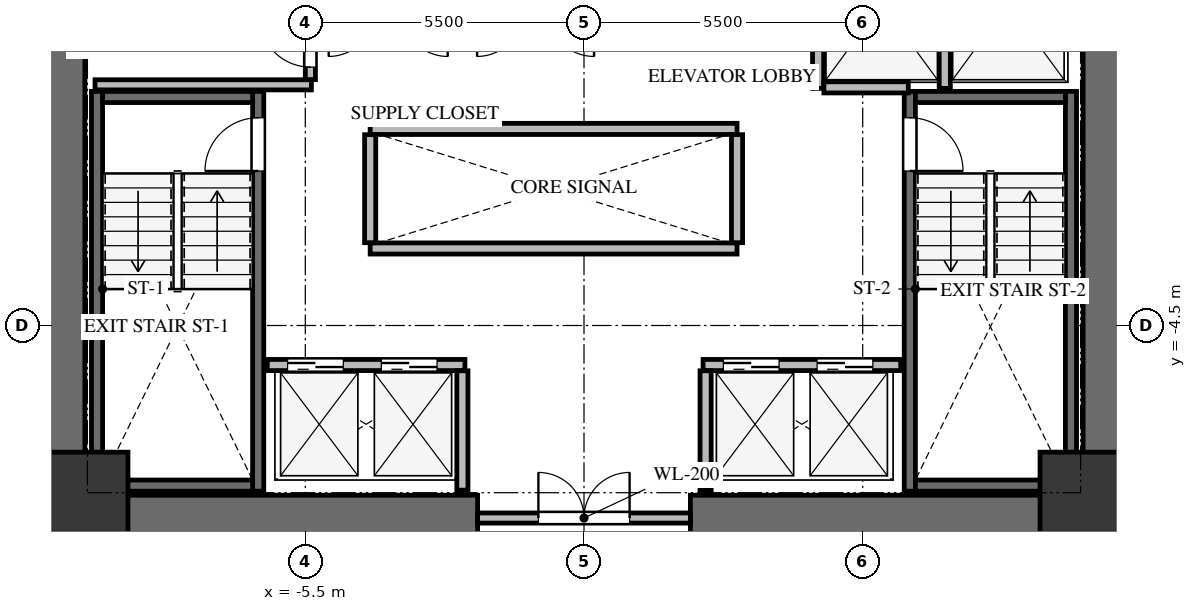
"""IFC4 building model, lengths in metres.
Left out: names, types, materials, properties, quantities, classifications, styles, units other than length and angle.
Written with IfcOpenShell. Run it as: python <this file> out.ifc"""

import sys

from ifc_helpers import new_model, si_unit, direction, frame, frame_2d, origin, origin_2d, place, context, subcontext, project, spatial, rectangle, extrude, source, transform, mapped, element, fill, save


model = new_model("IFC4")
c1 = context("Model", 3, precision=1e-05, world=origin(), true_north=direction((0.0, 1.0)))
c2 = subcontext(c1, "Body", "Model", "MODEL_VIEW")
j1 = project(units=[si_unit("LENGTHUNIT", "METRE"), si_unit("PLANEANGLEUNIT", "RADIAN")], contexts=[c1])
p1 = place(None, origin())
s1 = spatial("IfcSite", under=j1, at=p1, CompositionType="ELEMENT")
p2 = place(p1, origin())
s2 = spatial("IfcBuilding", under=s1, at=p2, CompositionType="ELEMENT")
p3 = place(p2, frame((0.0, 0.0, 81.3)))
s3 = spatial("IfcBuildingStorey", under=s2, at=p3, CompositionType="ELEMENT", Elevation=81.3)
for number, where, z_axis, x_axis in (
    (1, (-10.3, -8.75, 0.0), (0.0, 0.0, 1.0), (0.0, 1.0, 0.0)),
    (2, (10.3, -8.75, 0.0), (0.0, 0.0, 1.0), (0.0, 1.0, 0.0)),
):
    element("IfcWall", number, at=place(p3, frame(where, z_axis=z_axis, x_axis=x_axis)), inside=s3, PredefinedType="SHEAR", context=c2, shape_type="SweptSolid", body=[
        extrude(rectangle(XDim=17.5, YDim=0.9, at=frame_2d((8.75, 0.0))), origin(), (0.0, 0.0, 1.0), 3.0),
    ])
for number, where, z_axis, x_axis in (
    (3, (-9.85, -8.3, 0.0), (0.0, 0.0, 1.0), (1.0, 0.0, 0.0)),
    (4, (2.1, -8.3, 0.0), (0.0, 0.0, 1.0), (1.0, 0.0, 0.0)),
):
    element("IfcWall", number, at=place(p3, frame(where, z_axis=z_axis, x_axis=x_axis)), inside=s3, PredefinedType="SHEAR", context=c2, shape_type="SweptSolid", body=[
        extrude(rectangle(XDim=7.75, YDim=0.9, at=frame_2d((3.875, 0.0))), origin(), (0.0, 0.0, 1.0), 3.0),
    ])
p4 = place(p3, frame((-6.43, -7.77, -0.24), z_axis=(0.0, 0.0, 1.0), x_axis=(0.0, 1.0, 0.0)))
e5 = element("IfcWall", 5, at=p4, inside=s3, PredefinedType="SHEAR", context=c2, shape_type="SweptSolid", body=[
    extrude(rectangle(XDim=7.89, YDim=0.22, at=frame_2d((3.945, 0.0))), origin(), (0.0, 0.0, 1.0), 3.0),
])
p5 = place(p4, frame((6.32, 0.0, 0.0)))
e6 = element("IfcOpeningElement", 6, at=p5, cuts=e5, PredefinedType="OPENING", context=c2, shape_type="SweptSolid", body=[
    extrude(rectangle(XDim=1.05, YDim=2.15, at=frame_2d((0.525, 1.075))), frame((0.0, 0.12, 0.0), z_axis=(0.0, -1.0, 0.0), x_axis=(1.0, 0.0, 0.0)), (0.0, 0.0, 1.0), 0.24),
])
p6 = place(p3, frame((-9.61, 0.12, -0.24), z_axis=(0.0, 0.0, 1.0), x_axis=(0.0, -1.0, 0.0)))
e7 = element("IfcWall", 7, at=p6, inside=s3, PredefinedType="SHEAR", context=c2, shape_type="SweptSolid", body=[
    extrude(rectangle(XDim=7.89, YDim=0.22, at=frame_2d((3.945, 0.0))), origin(), (0.0, 0.0, 1.0), 3.0),
])
for number, where, z_axis, x_axis in (
    (8, (-9.5, -7.66, -0.24), (0.0, 0.0, 1.0), (1.0, 0.0, 0.0)),
    (9, (-6.54, 0.01, -0.24), (0.0, 0.0, 1.0), (-1.0, 0.0, 0.0)),
):
    element("IfcWall", number, at=place(p3, frame(where, z_axis=z_axis, x_axis=x_axis)), inside=s3, PredefinedType="SHEAR", context=c2, shape_type="SweptSolid", body=[
        extrude(rectangle(XDim=2.96, YDim=0.22, at=frame_2d((1.48, 0.0))), origin(), (0.0, 0.0, 1.0), 3.0),
    ])
p7 = place(p3, frame((9.61, -7.77, -0.24), z_axis=(0.0, 0.0, 1.0), x_axis=(0.0, 1.0, 0.0)))
e10 = element("IfcWall", 10, at=p7, inside=s3, PredefinedType="SHEAR", context=c2, shape_type="SweptSolid", body=[
    extrude(rectangle(XDim=7.89, YDim=0.22, at=frame_2d((3.945, 0.0))), origin(), (0.0, 0.0, 1.0), 3.0),
])
p8 = place(p3, frame((6.43, 0.12, -0.24), z_axis=(0.0, 0.0, 1.0), x_axis=(0.0, -1.0, 0.0)))
e11 = element("IfcWall", 11, at=p8, inside=s3, PredefinedType="SHEAR", context=c2, shape_type="SweptSolid", body=[
    extrude(rectangle(XDim=7.89, YDim=0.22, at=frame_2d((3.945, 0.0))), origin(), (0.0, 0.0, 1.0), 3.0),
])
p9 = place(p8, frame((0.52, 0.0, 0.0)))
e12 = element("IfcOpeningElement", 12, at=p9, cuts=e11, PredefinedType="OPENING", context=c2, shape_type="SweptSolid", body=[
    extrude(rectangle(XDim=1.05, YDim=2.15, at=frame_2d((0.525, 1.075))), frame((0.0, 0.12, 0.0), z_axis=(0.0, -1.0, 0.0), x_axis=(1.0, 0.0, 0.0)), (0.0, 0.0, 1.0), 0.24),
])
for number, where, z_axis, x_axis in (
    (13, (6.54, -7.66, -0.24), (0.0, 0.0, 1.0), (1.0, 0.0, 0.0)),
    (14, (9.5, 0.01, -0.24), (0.0, 0.0, 1.0), (-1.0, 0.0, 0.0)),
):
    element("IfcWall", number, at=place(p3, frame(where, z_axis=z_axis, x_axis=x_axis)), inside=s3, PredefinedType="SHEAR", context=c2, shape_type="SweptSolid", body=[
        extrude(rectangle(XDim=2.96, YDim=0.22, at=frame_2d((1.48, 0.0))), origin(), (0.0, 0.0, 1.0), 3.0),
    ])
m1 = source(origin(), c2, "Body", "SweptSolid", [
    extrude(rectangle(XDim=1.6, YDim=1.6, at=origin_2d()), origin(), (0.0, 0.0, 1.0), 3.0),
])
for number, where, z_axis, x_axis in (
    (15, (-9.8, -7.8, -0.24), (0.0, 0.0, 1.0), (1.0, 0.0, 0.0)),
    (16, (9.8, -7.8, -0.24), (0.0, 0.0, 1.0), (1.0, 0.0, 0.0)),
):
    element("IfcColumn", number, at=place(p3, frame(where, z_axis=z_axis, x_axis=x_axis)), inside=s3, PredefinedType="COLUMN", context=c2, shape_type="MappedRepresentation", body=[
        mapped(m1, transform((0.0, 0.0, 0.0), x_axis=(1.0, 0.0, 0.0), y_axis=(0.0, 1.0, 0.0), z_axis=(0.0, 0.0, 1.0), scale=1.0)),
    ])
p10 = place(p3, frame((-2.1, -8.3, 0.0), z_axis=(0.0, 0.0, 1.0), x_axis=(1.0, 0.0, 0.0)))
e17 = element("IfcWall", 17, at=p10, inside=s3, PredefinedType="SOLIDWALL", context=c2, shape_type="SweptSolid", body=[
    extrude(rectangle(XDim=4.2, YDim=0.2, at=frame_2d((2.1, 0.0))), origin(), (0.0, 0.0, 1.0), 2.745),
])
p11 = place(p10, frame((1.2, 0.0, 0.0)))
e18 = element("IfcOpeningElement", 18, at=p11, cuts=e17, PredefinedType="OPENING", context=c2, shape_type="SweptSolid", body=[
    extrude(rectangle(XDim=1.8, YDim=2.15, at=frame_2d((0.9, 1.075))), frame((0.0, 0.11, 0.0), z_axis=(0.0, -1.0, 0.0), x_axis=(1.0, 0.0, 0.0)), (0.0, 0.0, 1.0), 0.22),
])
p12 = place(p3, frame((-9.65, 0.25, 0.0), z_axis=(0.0, 0.0, 1.0), x_axis=(1.0, 0.0, 0.0)))
e19 = element("IfcWall", 19, at=p12, inside=s3, PredefinedType="SOLIDWALL", context=c2, shape_type="SweptSolid", body=[
    extrude(rectangle(XDim=4.27, YDim=0.2, at=frame_2d((2.135, 0.0))), origin(), (0.0, 0.0, 1.0), 2.745),
])
p13 = place(p3, frame((-5.4, 0.354, 0.0), z_axis=(0.0, 0.0, 1.0), x_axis=(0.0, 1.0, 0.0)))
e20 = element("IfcWall", 20, at=p13, inside=s3, PredefinedType="SOLIDWALL", context=c2, shape_type="SweptSolid", body=[
    extrude(rectangle(XDim=4.026, YDim=0.2, at=frame_2d((2.013, 0.0))), origin(), (0.0, 0.0, 1.0), 2.745),
])
p14 = place(p13, frame((0.246, 0.0, 0.0)))
e21 = element("IfcOpeningElement", 21, at=p14, cuts=e20, PredefinedType="OPENING", context=c2, shape_type="SweptSolid", body=[
    extrude(rectangle(XDim=1.0, YDim=2.15, at=frame_2d((0.5, 1.075))), frame((0.0, 0.11, 0.0), z_axis=(0.0, -1.0, 0.0), x_axis=(1.0, 0.0, 0.0)), (0.0, 0.0, 1.0), 0.22),
])
for number, where, z_axis, x_axis in (
    (22, (4.62, 0.18, 0.0), (0.0, 0.0, 1.0), (0.0, 1.0, 0.0)),
    (23, (7.12, 0.18, 0.0), (0.0, 0.0, 1.0), (0.0, 1.0, 0.0)),
):
    element("IfcWall", number, at=place(p3, frame(where, z_axis=z_axis, x_axis=x_axis)), inside=s3, PredefinedType="SOLIDWALL", context=c2, shape_type="SweptSolid", body=[
        extrude(rectangle(XDim=3.186, YDim=0.22, at=frame_2d((1.593, 0.0))), origin(), (0.0, 0.0, 1.0), 2.745),
    ])
p15 = place(p3, frame((4.734, 0.2, 0.0), z_axis=(0.0, 0.0, 1.0), x_axis=(1.0, 0.0, 0.0)))
e24 = element("IfcWall", 24, at=p15, inside=s3, PredefinedType="SOLIDWALL", context=c2, shape_type="SweptSolid", body=[
    extrude(rectangle(XDim=1.666, YDim=0.22, at=frame_2d((0.833, 0.0))), origin(), (0.0, 0.0, 1.0), 2.745),
])
p16 = place(p3, frame((-6.25, -5.28, 0.0), z_axis=(0.0, 0.0, 1.0), x_axis=(1.0, 0.0, 0.0)))
e25 = element("IfcWall", 25, at=p16, inside=s3, PredefinedType="SOLIDWALL", context=c2, shape_type="SweptSolid", body=[
    extrude(rectangle(XDim=3.9, YDim=0.22, at=frame_2d((1.95, 0.0))), origin(), (0.0, 0.0, 1.0), 2.745),
])
p17 = place(p16, frame((0.4, 0.0, 0.0)))
e26 = element("IfcOpeningElement", 26, at=p17, cuts=e25, PredefinedType="OPENING", context=c2, shape_type="SweptSolid", body=[
    extrude(rectangle(XDim=1.1, YDim=2.15, at=frame_2d((0.55, 1.075))), frame((0.0, 0.12, 0.0), z_axis=(0.0, -1.0, 0.0), x_axis=(1.0, 0.0, 0.0)), (0.0, 0.0, 1.0), 0.24),
])
p18 = place(p16, frame((2.25, 0.0, 0.0)))
e27 = element("IfcOpeningElement", 27, at=p18, cuts=e25, PredefinedType="OPENING", context=c2, shape_type="SweptSolid", body=[
    extrude(rectangle(XDim=1.1, YDim=2.15, at=frame_2d((0.55, 1.075))), frame((0.0, 0.12, 0.0), z_axis=(0.0, -1.0, 0.0), x_axis=(1.0, 0.0, 0.0)), (0.0, 0.0, 1.0), 0.24),
])
p19 = place(p3, frame((2.35, -5.28, 0.0), z_axis=(0.0, 0.0, 1.0), x_axis=(1.0, 0.0, 0.0)))
e28 = element("IfcWall", 28, at=p19, inside=s3, PredefinedType="SOLIDWALL", context=c2, shape_type="SweptSolid", body=[
    extrude(rectangle(XDim=3.9, YDim=0.22, at=frame_2d((1.95, 0.0))), origin(), (0.0, 0.0, 1.0), 2.745),
])
p20 = place(p19, frame((0.4, 0.0, 0.0)))
e29 = element("IfcOpeningElement", 29, at=p20, cuts=e28, PredefinedType="OPENING", context=c2, shape_type="SweptSolid", body=[
    extrude(rectangle(XDim=1.1, YDim=2.15, at=frame_2d((0.55, 1.075))), frame((0.0, 0.12, 0.0), z_axis=(0.0, -1.0, 0.0), x_axis=(1.0, 0.0, 0.0)), (0.0, 0.0, 1.0), 0.24),
])
p21 = place(p19, frame((2.25, 0.0, 0.0)))
e30 = element("IfcOpeningElement", 30, at=p21, cuts=e28, PredefinedType="OPENING", context=c2, shape_type="SweptSolid", body=[
    extrude(rectangle(XDim=1.1, YDim=2.15, at=frame_2d((0.55, 1.075))), frame((0.0, 0.12, 0.0), z_axis=(0.0, -1.0, 0.0), x_axis=(1.0, 0.0, 0.0)), (0.0, 0.0, 1.0), 0.24),
])
for number, where, z_axis, x_axis in (
    (31, (-2.4, -7.75, 0.0), (0.0, 0.0, 1.0), (0.0, 1.0, 0.0)),
    (32, (2.4, -7.75, 0.0), (0.0, 0.0, 1.0), (0.0, 1.0, 0.0)),
):
    element("IfcWall", number, at=place(p3, frame(where, z_axis=z_axis, x_axis=x_axis)), inside=s3, PredefinedType="SOLIDWALL", context=c2, shape_type="SweptSolid", body=[
        extrude(rectangle(XDim=2.356, YDim=0.22, at=frame_2d((1.178, 0.0))), origin(), (0.0, 0.0, 1.0), 2.745),
    ])
for number, where, z_axis, x_axis in (
    (33, (-4.22, -2.98, 0.0), (0.0, 0.0, 1.0), (1.0, 0.0, 0.0)),
    (34, (-4.22, -0.62, 0.0), (0.0, 0.0, 1.0), (1.0, 0.0, 0.0)),
):
    element("IfcWall", number, at=place(p3, frame(where, z_axis=z_axis, x_axis=x_axis)), inside=s3, PredefinedType="SOLIDWALL", context=c2, shape_type="SweptSolid", body=[
        extrude(rectangle(XDim=7.24, YDim=0.22, at=frame_2d((3.62, 0.0))), origin(), (0.0, 0.0, 1.0), 2.745),
    ])
for number, where, z_axis, x_axis in (
    (35, (-4.22, -2.866, 0.0), (0.0, 0.0, 1.0), (0.0, 1.0, 0.0)),
    (36, (3.02, -2.866, 0.0), (0.0, 0.0, 1.0), (0.0, 1.0, 0.0)),
):
    element("IfcWall", number, at=place(p3, frame(where, z_axis=z_axis, x_axis=x_axis)), inside=s3, PredefinedType="SOLIDWALL", context=c2, shape_type="SweptSolid", body=[
        extrude(rectangle(XDim=2.132, YDim=0.22, at=frame_2d((1.066, 0.0))), origin(), (0.0, 0.0, 1.0), 2.745),
    ])
m2 = source(origin(), c2, "Body", "SweptSolid", [
    extrude(rectangle(XDim=1.05, YDim=2.15, at=frame_2d((0.525, 1.075))), frame((0.0, 0.025, 0.0), z_axis=(0.0, -1.0, 0.0), x_axis=(1.0, 0.0, 0.0)), (0.0, 0.0, 1.0), 0.05),
])
p22 = place(p5, origin())
e37 = element("IfcDoor", 37, at=p22, inside=s3, OperationType="SINGLE_SWING_LEFT", PredefinedType="DOOR", context=c2, shape_type="MappedRepresentation", body=[
    mapped(m2, transform((0.0, 0.0, 0.0), x_axis=(1.0, 0.0, 0.0), y_axis=(0.0, 1.0, 0.0), z_axis=(0.0, 0.0, 1.0), scale=1.0)),
])
fill(e6, e37)
m3 = source(origin(), c2, "Body", "SweptSolid", [
    extrude(rectangle(XDim=1.05, YDim=2.15, at=frame_2d((0.525, 1.075))), frame((0.0, 0.025, 0.0), z_axis=(0.0, -1.0, 0.0), x_axis=(1.0, 0.0, 0.0)), (0.0, 0.0, 1.0), 0.05),
])
p23 = place(p9, origin())
e38 = element("IfcDoor", 38, at=p23, inside=s3, OperationType="SINGLE_SWING_RIGHT", PredefinedType="DOOR", context=c2, shape_type="MappedRepresentation", body=[
    mapped(m3, transform((0.0, 0.0, 0.0), x_axis=(1.0, 0.0, 0.0), y_axis=(0.0, 1.0, 0.0), z_axis=(0.0, 0.0, 1.0), scale=1.0)),
])
fill(e12, e38)
m4 = source(origin(), c2, "Body", "SweptSolid", [
    extrude(rectangle(XDim=1.8, YDim=2.15, at=frame_2d((0.9, 1.075))), frame((0.0, 0.025, 0.0), z_axis=(0.0, -1.0, 0.0), x_axis=(1.0, 0.0, 0.0)), (0.0, 0.0, 1.0), 0.05),
])
p24 = place(p11, origin())
e39 = element("IfcDoor", 39, at=p24, inside=s3, OperationType="DOUBLE_DOOR_SINGLE_SWING", PredefinedType="DOOR", context=c2, shape_type="MappedRepresentation", body=[
    mapped(m4, transform((0.0, 0.0, 0.0), x_axis=(1.0, 0.0, 0.0), y_axis=(0.0, 1.0, 0.0), z_axis=(0.0, 0.0, 1.0), scale=1.0)),
])
fill(e18, e39)
m5 = source(origin(), c2, "Body", "SweptSolid", [
    extrude(rectangle(XDim=1.0, YDim=2.15, at=frame_2d((0.5, 1.075))), frame((0.0, 0.025, 0.0), z_axis=(0.0, -1.0, 0.0), x_axis=(1.0, 0.0, 0.0)), (0.0, 0.0, 1.0), 0.05),
])
p25 = place(p14, origin())
e40 = element("IfcDoor", 40, at=p25, inside=s3, OperationType="SINGLE_SWING_RIGHT", PredefinedType="DOOR", context=c2, shape_type="MappedRepresentation", body=[
    mapped(m5, transform((0.0, 0.0, 0.0), x_axis=(1.0, 0.0, 0.0), y_axis=(0.0, 1.0, 0.0), z_axis=(0.0, 0.0, 1.0), scale=1.0)),
])
fill(e21, e40)
m6 = source(origin(), c2, "Body", "SweptSolid", [
    extrude(rectangle(XDim=1.1, YDim=2.15, at=frame_2d((0.55, 1.075))), frame((0.0, 0.025, 0.0), z_axis=(0.0, -1.0, 0.0), x_axis=(1.0, 0.0, 0.0)), (0.0, 0.0, 1.0), 0.05),
])
p26 = place(p17, origin())
e41 = element("IfcDoor", 41, at=p26, inside=s3, OperationType="DOUBLE_DOOR_SLIDING", PredefinedType="DOOR", context=c2, shape_type="MappedRepresentation", body=[
    mapped(m6, transform((0.0, 0.0, 0.0), x_axis=(1.0, 0.0, 0.0), y_axis=(0.0, 1.0, 0.0), z_axis=(0.0, 0.0, 1.0), scale=1.0)),
])
fill(e26, e41)
p27 = place(p18, origin())
e42 = element("IfcDoor", 42, at=p27, inside=s3, OperationType="DOUBLE_DOOR_SLIDING", PredefinedType="DOOR", context=c2, shape_type="MappedRepresentation", body=[
    mapped(m6, transform((0.0, 0.0, 0.0), x_axis=(1.0, 0.0, 0.0), y_axis=(0.0, 1.0, 0.0), z_axis=(0.0, 0.0, 1.0), scale=1.0)),
])
fill(e27, e42)
p28 = place(p20, origin())
e43 = element("IfcDoor", 43, at=p28, inside=s3, OperationType="DOUBLE_DOOR_SLIDING", PredefinedType="DOOR", context=c2, shape_type="MappedRepresentation", body=[
    mapped(m6, transform((0.0, 0.0, 0.0), x_axis=(1.0, 0.0, 0.0), y_axis=(0.0, 1.0, 0.0), z_axis=(0.0, 0.0, 1.0), scale=1.0)),
])
fill(e29, e43)
p29 = place(p21, origin())
e44 = element("IfcDoor", 44, at=p29, inside=s3, OperationType="DOUBLE_DOOR_SLIDING", PredefinedType="DOOR", context=c2, shape_type="MappedRepresentation", body=[
    mapped(m6, transform((0.0, 0.0, 0.0), x_axis=(1.0, 0.0, 0.0), y_axis=(0.0, 1.0, 0.0), z_axis=(0.0, 0.0, 1.0), scale=1.0)),
])
fill(e30, e44)
save(model, sys.argv[1])
